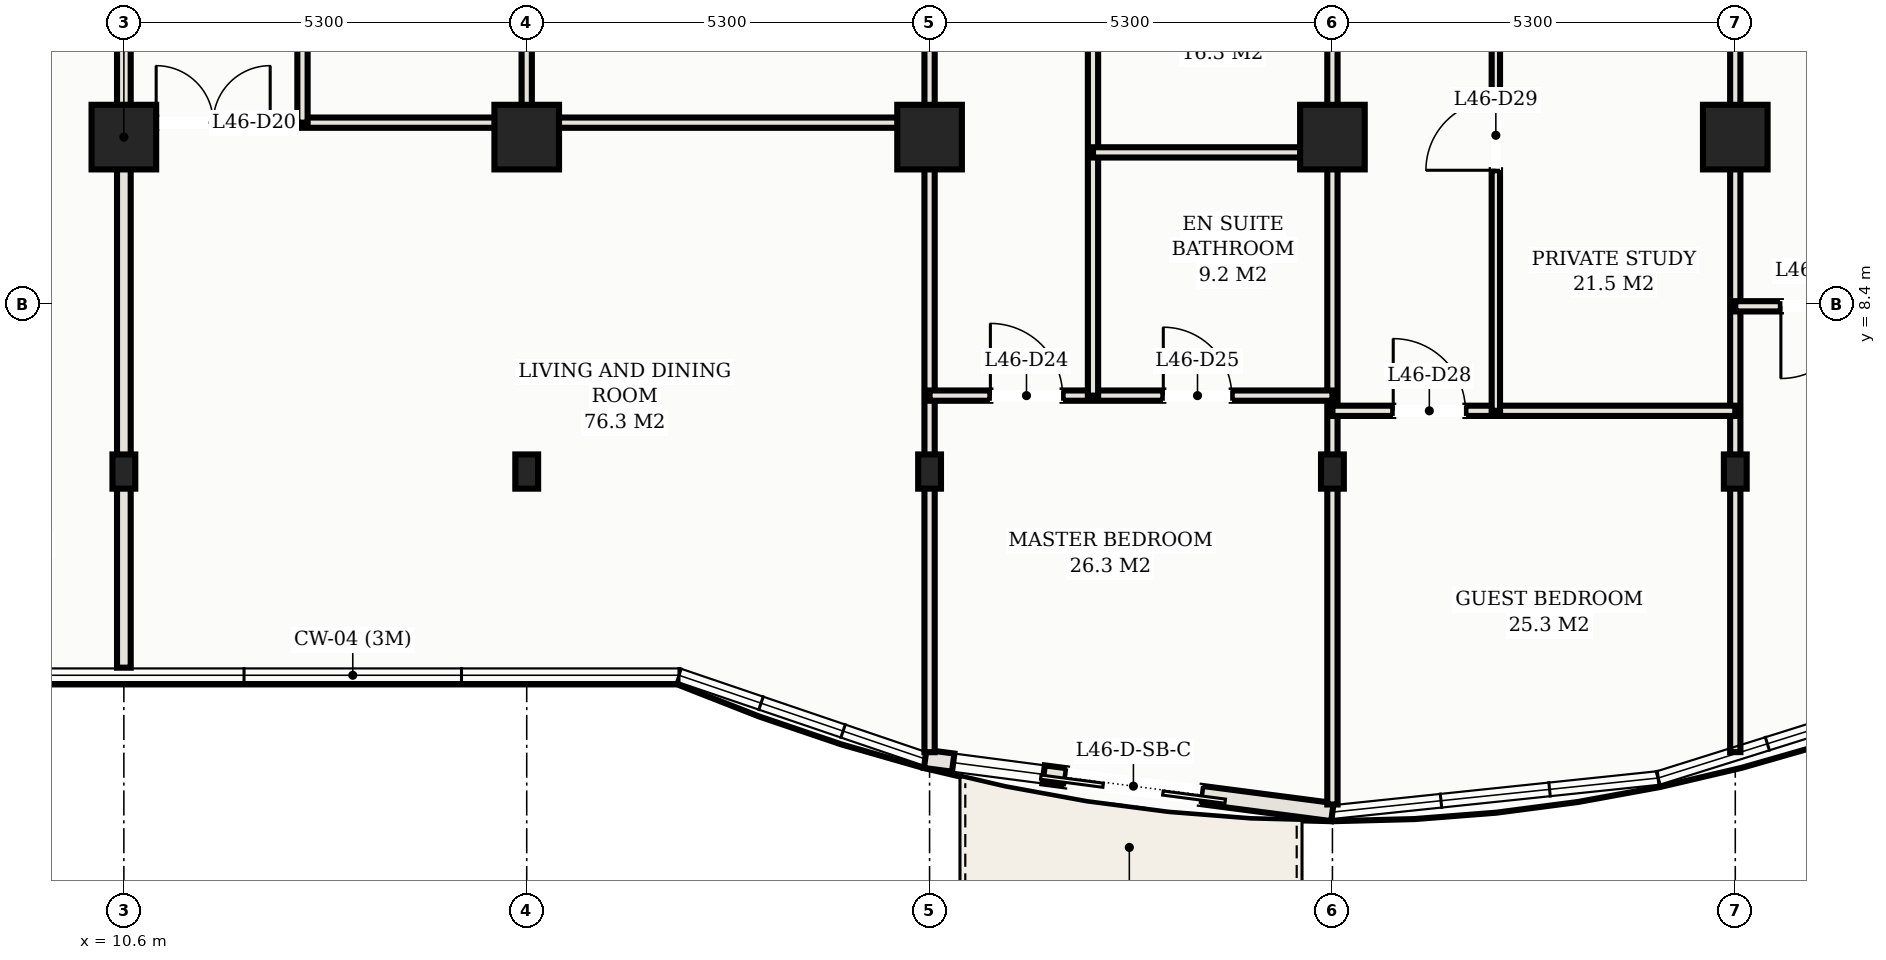
"""IFC4 building model, lengths in metres.
Left out: names, types, materials, properties, quantities, classifications, styles, units other than length and angle.
Written with IfcOpenShell. Run it as: python <this file> out.ifc"""

import sys

from ifc_helpers import new_model, si_unit, direction, frame, frame_2d, origin, origin_2d, place, context, subcontext, project, spatial, rectangle, hollow_rectangle, extrude, element, fill, save


model = new_model("IFC4")
c1 = context("Model", 3, precision=1e-05, world=origin(), true_north=direction((0.0, 1.0)))
c2 = subcontext(c1, "Body", "Model", "MODEL_VIEW")
j1 = project(units=[si_unit("LENGTHUNIT", "METRE"), si_unit("PLANEANGLEUNIT", "RADIAN")], contexts=[c1])
p1 = place(None, origin())
s1 = spatial("IfcSite", under=j1, at=p1, CompositionType="ELEMENT")
p2 = place(p1, origin())
s2 = spatial("IfcBuilding", under=s1, at=p2, CompositionType="ELEMENT")
p3 = place(p2, frame((0.0, 0.0, 168.9)))
s3 = spatial("IfcBuildingStorey", under=s2, at=p3, CompositionType="ELEMENT", Elevation=168.9)
for number, where, z_axis, x_axis in (
    (1, (10.6, 10.6, 0.0), (0.0, 0.0, 1.0), (1.0, 0.0, 0.0)),
    (2, (15.9, 10.6, 0.0), (0.0, 0.0, 1.0), (1.0, 0.0, 0.0)),
    (3, (21.2, 10.6, 0.0), (0.0, 0.0, 1.0), (1.0, 0.0, 0.0)),
    (4, (26.5, 10.6, 0.0), (0.0, 0.0, 1.0), (1.0, 0.0, 0.0)),
    (5, (31.8, 10.6, 0.0), (0.0, 0.0, 1.0), (1.0, 0.0, 0.0)),
):
    element("IfcColumn", number, at=place(p3, frame(where, z_axis=z_axis, x_axis=x_axis)), inside=s3, PredefinedType="COLUMN", context=c2, shape_type="SweptSolid", body=[
        extrude(hollow_rectangle(XDim=0.85, YDim=0.85, WallThickness=0.028, at=origin_2d()), origin(), (0.0, 0.0, 1.0), 3.3),
    ])
for number, where, z_axis, x_axis in (
    (6, (10.6, 6.2, 0.0), (0.0, 0.0, 1.0), (1.0, 0.0, 0.0)),
    (7, (15.9, 6.2, 0.0), (0.0, 0.0, 1.0), (1.0, 0.0, 0.0)),
    (8, (21.2, 6.2, 0.0), (0.0, 0.0, 1.0), (1.0, 0.0, 0.0)),
    (9, (26.5, 6.2, 0.0), (0.0, 0.0, 1.0), (1.0, 0.0, 0.0)),
    (10, (31.8, 6.2, 0.0), (0.0, 0.0, 1.0), (1.0, 0.0, 0.0)),
):
    element("IfcColumn", number, at=place(p3, frame(where, z_axis=z_axis, x_axis=x_axis)), inside=s3, PredefinedType="COLUMN", context=c2, shape_type="SweptSolid", body=[
        extrude(hollow_rectangle(XDim=0.3, YDim=0.45, WallThickness=0.016, at=origin_2d()), origin(), (0.0, 0.0, 1.0), 3.3),
    ])
p4 = place(p3, frame((21.142, 2.419, 0.0), z_axis=(0.0, 0.0, 1.0), x_axis=(0.991597639478, -0.129360432053, 0.0)))
e11 = element("IfcWall", 11, at=p4, inside=s3, PredefinedType="SOLIDWALL", context=c2, shape_type="SweptSolid", body=[
    extrude(rectangle(XDim=5.403, YDim=0.24, at=frame_2d((2.702, 0.0))), origin(), (0.0, 0.0, 1.0), 3.1),
])
p5 = place(p4, frame((1.863, 0.0, 0.0)))
e12 = element("IfcOpeningElement", 12, at=p5, cuts=e11, PredefinedType="OPENING", context=c2, shape_type="SweptSolid", body=[
    extrude(rectangle(XDim=1.8, YDim=2.2, at=frame_2d((0.9, 1.1))), frame((0.0, 0.13, 0.0), z_axis=(0.0, -1.0, 0.0), x_axis=(1.0, 0.0, 0.0)), (0.0, 0.0, 1.0), 0.26),
])
p6 = place(p4, frame((0.372, 0.0, 0.75)))
e13 = element("IfcOpeningElement", 13, at=p6, cuts=e11, PredefinedType="OPENING", context=c2, shape_type="SweptSolid", body=[
    extrude(rectangle(XDim=1.2, YDim=1.5, at=frame_2d((0.6, 0.75))), frame((0.0, 0.13, 0.0), z_axis=(0.0, -1.0, 0.0), x_axis=(1.0, 0.0, 0.0)), (0.0, 0.0, 1.0), 0.26),
])
p7 = place(p3, frame((10.6, 3.62, 0.0), z_axis=(0.0, 0.0, 1.0), x_axis=(0.0, 1.0, 0.0)))
e14 = element("IfcWall", 14, at=p7, inside=s3, PredefinedType="PARTITIONING", context=c2, shape_type="SweptSolid", body=[
    extrude(rectangle(XDim=17.88, YDim=0.18, at=frame_2d((8.94, 0.0))), origin(), (0.0, 0.0, 1.0), 2.38),
])
p8 = place(p3, frame((21.2, 2.508, 0.0), z_axis=(0.0, 0.0, 1.0), x_axis=(0.0, 1.0, 0.0)))
e15 = element("IfcWall", 15, at=p8, inside=s3, PredefinedType="PARTITIONING", context=c2, shape_type="SweptSolid", body=[
    extrude(rectangle(XDim=18.992, YDim=0.135, at=frame_2d((9.496, 0.0))), origin(), (0.0, 0.0, 1.0), 2.38),
])
p9 = place(p8, frame((17.207, 0.0, 0.0)))
e16 = element("IfcOpeningElement", 16, at=p9, cuts=e15, PredefinedType="OPENING", context=c2, shape_type="SweptSolid", body=[
    extrude(rectangle(XDim=0.92, YDim=2.15, at=frame_2d((0.46, 1.075))), frame((0.0, 0.078, 0.0), z_axis=(0.0, -1.0, 0.0), x_axis=(1.0, 0.0, 0.0)), (0.0, 0.0, 1.0), 0.155),
])
p10 = place(p3, frame((26.5, 1.82, 0.0), z_axis=(0.0, 0.0, 1.0), x_axis=(0.0, 1.0, 0.0)))
e17 = element("IfcWall", 17, at=p10, inside=s3, PredefinedType="PARTITIONING", context=c2, shape_type="SweptSolid", body=[
    extrude(rectangle(XDim=19.68, YDim=0.135, at=frame_2d((9.84, 0.0))), origin(), (0.0, 0.0, 1.0), 2.38),
])
p11 = place(p10, frame((17.895, 0.0, 0.0)))
e18 = element("IfcOpeningElement", 18, at=p11, cuts=e17, PredefinedType="OPENING", context=c2, shape_type="SweptSolid", body=[
    extrude(rectangle(XDim=0.92, YDim=2.15, at=frame_2d((0.46, 1.075))), frame((0.0, 0.078, 0.0), z_axis=(0.0, -1.0, 0.0), x_axis=(1.0, 0.0, 0.0)), (0.0, 0.0, 1.0), 0.155),
])
p12 = place(p3, frame((31.8, 2.509, 0.0), z_axis=(0.0, 0.0, 1.0), x_axis=(0.0, 1.0, 0.0)))
e19 = element("IfcWall", 19, at=p12, inside=s3, PredefinedType="PARTITIONING", context=c2, shape_type="SweptSolid", body=[
    extrude(rectangle(XDim=18.991, YDim=0.135, at=frame_2d((9.496, 0.0))), origin(), (0.0, 0.0, 1.0), 2.38),
])
p13 = place(p12, frame((17.206, 0.0, 0.0)))
e20 = element("IfcOpeningElement", 20, at=p13, cuts=e19, PredefinedType="OPENING", context=c2, shape_type="SweptSolid", body=[
    extrude(rectangle(XDim=0.92, YDim=2.15, at=frame_2d((0.46, 1.075))), frame((0.0, 0.078, 0.0), z_axis=(0.0, -1.0, 0.0), x_axis=(1.0, 0.0, 0.0)), (0.0, 0.0, 1.0), 0.155),
])
p14 = place(p3, frame((15.9, 10.79, 0.0), z_axis=(0.0, 0.0, 1.0), x_axis=(0.0, 1.0, 0.0)))
e21 = element("IfcWall", 21, at=p14, inside=s3, PredefinedType="PARTITIONING", context=c2, shape_type="SweptSolid", body=[
    extrude(rectangle(XDim=4.01, YDim=0.135, at=frame_2d((2.005, 0.0))), origin(), (0.0, 0.0, 1.0), 2.38),
])
p15 = place(p3, frame((10.6, 10.79, 0.0), z_axis=(0.0, 0.0, 1.0), x_axis=(1.0, 0.0, 0.0)))
e22 = element("IfcWall", 22, at=p15, inside=s3, PredefinedType="PARTITIONING", context=c2, shape_type="SweptSolid", body=[
    extrude(rectangle(XDim=10.6, YDim=0.135, at=frame_2d((5.3, 0.0))), origin(), (0.0, 0.0, 1.0), 2.38),
])
p16 = place(p15, frame((0.425, 0.0, 0.0)))
e23 = element("IfcOpeningElement", 23, at=p16, cuts=e22, PredefinedType="OPENING", context=c2, shape_type="SweptSolid", body=[
    extrude(rectangle(XDim=1.5, YDim=2.25, at=frame_2d((0.75, 1.125))), frame((0.0, 0.078, 0.0), z_axis=(0.0, -1.0, 0.0), x_axis=(1.0, 0.0, 0.0)), (0.0, 0.0, 1.0), 0.155),
])
p17 = place(p3, frame((12.95, 10.79, 0.0), z_axis=(0.0, 0.0, 1.0), x_axis=(0.0, 1.0, 0.0)))
e24 = element("IfcWall", 24, at=p17, inside=s3, PredefinedType="PARTITIONING", context=c2, shape_type="SweptSolid", body=[
    extrude(rectangle(XDim=10.71, YDim=0.135, at=frame_2d((5.355, 0.0))), origin(), (0.0, 0.0, 1.0), 2.38),
])
p18 = place(p17, frame((2.218, 0.0, 0.0)))
e25 = element("IfcOpeningElement", 25, at=p18, cuts=e24, PredefinedType="OPENING", context=c2, shape_type="SweptSolid", body=[
    extrude(rectangle(XDim=0.92, YDim=2.15, at=frame_2d((0.46, 1.075))), frame((0.0, 0.078, 0.0), z_axis=(0.0, -1.0, 0.0), x_axis=(1.0, 0.0, 0.0)), (0.0, 0.0, 1.0), 0.155),
])
p19 = place(p17, frame((7.583, 0.0, 0.0)))
e26 = element("IfcOpeningElement", 26, at=p19, cuts=e24, PredefinedType="OPENING", context=c2, shape_type="SweptSolid", body=[
    extrude(rectangle(XDim=0.9, YDim=2.15, at=frame_2d((0.45, 1.075))), frame((0.0, 0.078, 0.0), z_axis=(0.0, -1.0, 0.0), x_axis=(1.0, 0.0, 0.0)), (0.0, 0.0, 1.0), 0.155),
])
p20 = place(p3, frame((21.2, 7.199, 0.0), z_axis=(0.0, 0.0, 1.0), x_axis=(1.0, 0.0, 0.0)))
e27 = element("IfcWall", 27, at=p20, inside=s3, PredefinedType="PARTITIONING", context=c2, shape_type="SweptSolid", body=[
    extrude(rectangle(XDim=5.3, YDim=0.135, at=frame_2d((2.65, 0.0))), origin(), (0.0, 0.0, 1.0), 2.38),
])
p21 = place(p20, frame((0.8, 0.0, 0.0)))
e28 = element("IfcOpeningElement", 28, at=p21, cuts=e27, PredefinedType="OPENING", context=c2, shape_type="SweptSolid", body=[
    extrude(rectangle(XDim=0.95, YDim=2.15, at=frame_2d((0.475, 1.075))), frame((0.0, 0.078, 0.0), z_axis=(0.0, -1.0, 0.0), x_axis=(1.0, 0.0, 0.0)), (0.0, 0.0, 1.0), 0.155),
])
p22 = place(p20, frame((3.075, 0.0, 0.0)))
e29 = element("IfcOpeningElement", 29, at=p22, cuts=e27, PredefinedType="OPENING", context=c2, shape_type="SweptSolid", body=[
    extrude(rectangle(XDim=0.9, YDim=2.15, at=frame_2d((0.45, 1.075))), frame((0.0, 0.078, 0.0), z_axis=(0.0, -1.0, 0.0), x_axis=(1.0, 0.0, 0.0)), (0.0, 0.0, 1.0), 0.155),
])
p23 = place(p3, frame((23.35, 7.199, 0.0), z_axis=(0.0, 0.0, 1.0), x_axis=(0.0, 1.0, 0.0)))
e30 = element("IfcWall", 30, at=p23, inside=s3, PredefinedType="PARTITIONING", context=c2, shape_type="SweptSolid", body=[
    extrude(rectangle(XDim=14.301, YDim=0.135, at=frame_2d((7.15, 0.0))), origin(), (0.0, 0.0, 1.0), 2.38),
])
p24 = place(p23, frame((5.516, 0.0, 0.0)))
e31 = element("IfcOpeningElement", 31, at=p24, cuts=e30, PredefinedType="OPENING", context=c2, shape_type="SweptSolid", body=[
    extrude(rectangle(XDim=0.92, YDim=2.15, at=frame_2d((0.46, 1.075))), frame((0.0, 0.078, 0.0), z_axis=(0.0, -1.0, 0.0), x_axis=(1.0, 0.0, 0.0)), (0.0, 0.0, 1.0), 0.155),
])
p25 = place(p3, frame((23.35, 10.399, 0.0), z_axis=(0.0, 0.0, 1.0), x_axis=(1.0, 0.0, 0.0)))
e32 = element("IfcWall", 32, at=p25, inside=s3, PredefinedType="PARTITIONING", context=c2, shape_type="SweptSolid", body=[
    extrude(rectangle(XDim=3.15, YDim=0.135, at=frame_2d((1.575, 0.0))), origin(), (0.0, 0.0, 1.0), 2.38),
])
p26 = place(p3, frame((26.5, 6.999, 0.0), z_axis=(0.0, 0.0, 1.0), x_axis=(1.0, 0.0, 0.0)))
e33 = element("IfcWall", 33, at=p26, inside=s3, PredefinedType="PARTITIONING", context=c2, shape_type="SweptSolid", body=[
    extrude(rectangle(XDim=5.3, YDim=0.135, at=frame_2d((2.65, 0.0))), origin(), (0.0, 0.0, 1.0), 2.38),
])
p27 = place(p26, frame((0.8, 0.0, 0.0)))
e34 = element("IfcOpeningElement", 34, at=p27, cuts=e33, PredefinedType="OPENING", context=c2, shape_type="SweptSolid", body=[
    extrude(rectangle(XDim=0.95, YDim=2.15, at=frame_2d((0.475, 1.075))), frame((0.0, 0.078, 0.0), z_axis=(0.0, -1.0, 0.0), x_axis=(1.0, 0.0, 0.0)), (0.0, 0.0, 1.0), 0.155),
])
p28 = place(p3, frame((28.65, 6.999, 0.0), z_axis=(0.0, 0.0, 1.0), x_axis=(0.0, 1.0, 0.0)))
e35 = element("IfcWall", 35, at=p28, inside=s3, PredefinedType="MOVABLE", context=c2, shape_type="SweptSolid", body=[
    extrude(rectangle(XDim=14.501, YDim=0.11, at=frame_2d((7.25, 0.0))), origin(), (0.0, 0.0, 1.0), 2.38),
])
p29 = place(p28, frame((3.165, 0.0, 0.0)))
e36 = element("IfcOpeningElement", 36, at=p29, cuts=e35, PredefinedType="OPENING", context=c2, shape_type="SweptSolid", body=[
    extrude(rectangle(XDim=0.92, YDim=2.15, at=frame_2d((0.46, 1.075))), frame((0.0, 0.065, 0.0), z_axis=(0.0, -1.0, 0.0), x_axis=(1.0, 0.0, 0.0)), (0.0, 0.0, 1.0), 0.13),
])
p30 = place(p28, frame((10.415, 0.0, 0.0)))
e37 = element("IfcOpeningElement", 37, at=p30, cuts=e35, PredefinedType="OPENING", context=c2, shape_type="SweptSolid", body=[
    extrude(rectangle(XDim=0.92, YDim=2.15, at=frame_2d((0.46, 1.075))), frame((0.0, 0.065, 0.0), z_axis=(0.0, -1.0, 0.0), x_axis=(1.0, 0.0, 0.0)), (0.0, 0.0, 1.0), 0.13),
])
p31 = place(p3, frame((31.8, 8.374, 0.0), z_axis=(0.0, 0.0, 1.0), x_axis=(1.0, 0.0, 0.0)))
e38 = element("IfcWall", 38, at=p31, inside=s3, PredefinedType="PARTITIONING", context=c2, shape_type="SweptSolid", body=[
    extrude(rectangle(XDim=5.3, YDim=0.135, at=frame_2d((2.65, 0.0))), origin(), (0.0, 0.0, 1.0), 2.38),
])
p32 = place(p31, frame((0.6, 0.0, 0.0)))
e39 = element("IfcOpeningElement", 39, at=p32, cuts=e38, PredefinedType="OPENING", context=c2, shape_type="SweptSolid", body=[
    extrude(rectangle(XDim=0.95, YDim=2.15, at=frame_2d((0.475, 1.075))), frame((0.0, 0.078, 0.0), z_axis=(0.0, -1.0, 0.0), x_axis=(1.0, 0.0, 0.0)), (0.0, 0.0, 1.0), 0.155),
])
p33 = place(p5, frame((1.8, 0.0, 0.0), z_axis=(0.0, 0.0, 1.0), x_axis=(-1.0, 0.0, 0.0)))
e40 = element("IfcDoor", 40, at=p33, inside=s3, OperationType="DOUBLE_DOOR_SLIDING", PredefinedType="DOOR", context=c2, shape_type="SweptSolid", body=[
    extrude(rectangle(XDim=1.8, YDim=2.2, at=frame_2d((0.9, 1.1))), frame((0.0, 0.025, 0.0), z_axis=(0.0, -1.0, 0.0), x_axis=(1.0, 0.0, 0.0)), (0.0, 0.0, 1.0), 0.05),
])
fill(e12, e40)
p34 = place(p6, origin())
e41 = element("IfcWindow", 41, at=p34, inside=s3, PartitioningType="SINGLE_PANEL", PredefinedType="WINDOW", context=c2, shape_type="SweptSolid", body=[
    extrude(rectangle(XDim=1.2, YDim=1.5, at=frame_2d((0.6, 0.75))), frame((0.0, 0.03, 0.0), z_axis=(0.0, -1.0, 0.0), x_axis=(1.0, 0.0, 0.0)), (0.0, 0.0, 1.0), 0.06),
])
fill(e13, e41)
p35 = place(p16, origin())
e42 = element("IfcDoor", 42, at=p35, inside=s3, OperationType="DOUBLE_DOOR_SINGLE_SWING", PredefinedType="DOOR", context=c2, shape_type="SweptSolid", body=[
    extrude(rectangle(XDim=1.5, YDim=2.25, at=frame_2d((0.75, 1.125))), frame((0.0, 0.025, 0.0), z_axis=(0.0, -1.0, 0.0), x_axis=(1.0, 0.0, 0.0)), (0.0, 0.0, 1.0), 0.05),
])
fill(e23, e42)
p36 = place(p21, origin())
e43 = element("IfcDoor", 43, at=p36, inside=s3, OperationType="SINGLE_SWING_LEFT", PredefinedType="DOOR", context=c2, shape_type="SweptSolid", body=[
    extrude(rectangle(XDim=0.95, YDim=2.15, at=frame_2d((0.475, 1.075))), frame((0.0, 0.025, 0.0), z_axis=(0.0, -1.0, 0.0), x_axis=(1.0, 0.0, 0.0)), (0.0, 0.0, 1.0), 0.05),
])
fill(e28, e43)
p37 = place(p22, origin())
e44 = element("IfcDoor", 44, at=p37, inside=s3, OperationType="SINGLE_SWING_LEFT", PredefinedType="DOOR", context=c2, shape_type="SweptSolid", body=[
    extrude(rectangle(XDim=0.9, YDim=2.15, at=frame_2d((0.45, 1.075))), frame((0.0, 0.025, 0.0), z_axis=(0.0, -1.0, 0.0), x_axis=(1.0, 0.0, 0.0)), (0.0, 0.0, 1.0), 0.05),
])
fill(e29, e44)
p38 = place(p27, origin())
e45 = element("IfcDoor", 45, at=p38, inside=s3, OperationType="SINGLE_SWING_LEFT", PredefinedType="DOOR", context=c2, shape_type="SweptSolid", body=[
    extrude(rectangle(XDim=0.95, YDim=2.15, at=frame_2d((0.475, 1.075))), frame((0.0, 0.025, 0.0), z_axis=(0.0, -1.0, 0.0), x_axis=(1.0, 0.0, 0.0)), (0.0, 0.0, 1.0), 0.05),
])
fill(e34, e45)
p39 = place(p29, origin())
e46 = element("IfcDoor", 46, at=p39, inside=s3, OperationType="SINGLE_SWING_LEFT", PredefinedType="DOOR", context=c2, shape_type="SweptSolid", body=[
    extrude(rectangle(XDim=0.92, YDim=2.15, at=frame_2d((0.46, 1.075))), frame((0.0, 0.025, 0.0), z_axis=(0.0, -1.0, 0.0), x_axis=(1.0, 0.0, 0.0)), (0.0, 0.0, 1.0), 0.05),
])
fill(e36, e46)
p40 = place(p32, frame((0.95, 0.0, 0.0), z_axis=(0.0, 0.0, 1.0), x_axis=(-1.0, 0.0, 0.0)))
e47 = element("IfcDoor", 47, at=p40, inside=s3, OperationType="SINGLE_SWING_RIGHT", PredefinedType="DOOR", context=c2, shape_type="SweptSolid", body=[
    extrude(rectangle(XDim=0.95, YDim=2.15, at=frame_2d((0.475, 1.075))), frame((0.0, 0.025, 0.0), z_axis=(0.0, -1.0, 0.0), x_axis=(1.0, 0.0, 0.0)), (0.0, 0.0, 1.0), 0.05),
])
fill(e39, e47)
save(model, sys.argv[1])
